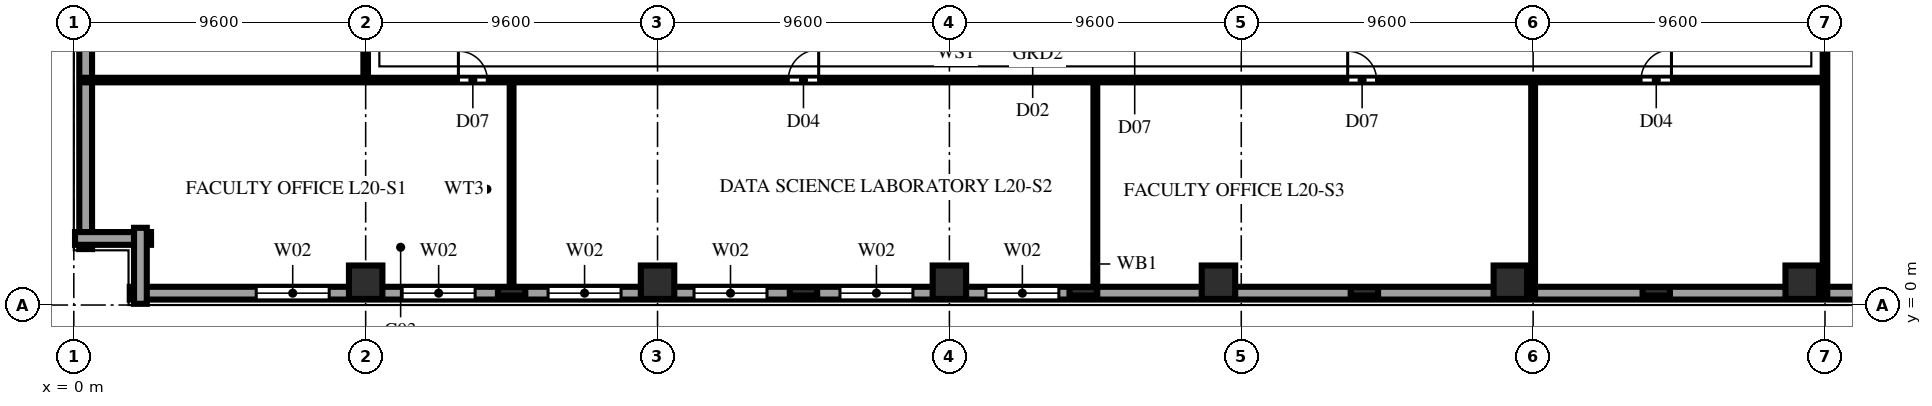
"""IFC4 building model, lengths in metres.
Left out: names, types, materials, properties, quantities, classifications, styles, units other than length and angle.
Written with IfcOpenShell. Run it as: python <this file> out.ifc"""

import sys

from ifc_helpers import new_model, si_unit, direction, frame, frame_2d, origin, origin_2d, place, context, subcontext, project, spatial, rectangle, extrude, element, fill, save


model = new_model("IFC4")
c1 = context("Model", 3, precision=1e-05, world=origin(), true_north=direction((0.0, 1.0)))
c2 = subcontext(c1, "Body", "Model", "MODEL_VIEW")
j1 = project(units=[si_unit("LENGTHUNIT", "METRE"), si_unit("PLANEANGLEUNIT", "RADIAN")], contexts=[c1])
p1 = place(None, origin())
s1 = spatial("IfcSite", under=j1, at=p1, CompositionType="ELEMENT")
p2 = place(p1, origin())
s2 = spatial("IfcBuilding", under=s1, at=p2, CompositionType="ELEMENT")
p3 = place(p2, frame((0.0, 0.0, 81.2)))
s3 = spatial("IfcBuildingStorey", under=s2, at=p3, CompositionType="ELEMENT", Elevation=81.2)
for number, where, z_axis, x_axis in (
    (1, (9.6, 0.75, 0.0), (0.0, 0.0, 1.0), (1.0, 0.0, 0.0)),
    (2, (19.2, 0.75, 0.0), (0.0, 0.0, 1.0), (1.0, 0.0, 0.0)),
    (3, (28.8, 0.75, 0.0), (0.0, 0.0, 1.0), (1.0, 0.0, 0.0)),
    (4, (37.65, 0.75, 0.0), (0.0, 0.0, 1.0), (1.0, 0.0, 0.0)),
    (5, (47.25, 0.75, 0.0), (0.0, 0.0, 1.0), (1.0, 0.0, 0.0)),
    (6, (56.85, 0.75, 0.0), (0.0, 0.0, 1.0), (1.0, 0.0, 0.0)),
):
    element("IfcColumn", number, at=place(p3, frame(where, z_axis=z_axis, x_axis=x_axis)), inside=s3, PredefinedType="COLUMN", context=c2, shape_type="SweptSolid", body=[
        extrude(rectangle(XDim=1.1, YDim=1.1, at=origin_2d()), origin(), (0.0, 0.0, 1.0), 3.8),
    ])
for number, where, z_axis, x_axis in (
    (7, (14.4, 0.45, 0.0), (0.0, 0.0, 1.0), (1.0, 0.0, 0.0)),
    (8, (24.0, 0.45, 0.0), (0.0, 0.0, 1.0), (1.0, 0.0, 0.0)),
    (9, (33.2, 0.45, 0.0), (0.0, 0.0, 1.0), (1.0, 0.0, 0.0)),
    (10, (42.45, 0.45, 0.0), (0.0, 0.0, 1.0), (1.0, 0.0, 0.0)),
    (11, (52.05, 0.45, 0.0), (0.0, 0.0, 1.0), (1.0, 0.0, 0.0)),
):
    element("IfcColumn", number, at=place(p3, frame(where, z_axis=z_axis, x_axis=x_axis)), inside=s3, PredefinedType="PILASTER", context=c2, shape_type="SweptSolid", body=[
        extrude(rectangle(XDim=0.9, YDim=0.28, at=origin_2d()), origin(), (0.0, 0.0, 1.0), 3.8),
    ])
p4 = place(p3, frame((1.84, 0.39, 0.0), z_axis=(0.0, 0.0, 1.0), x_axis=(1.0, 0.0, 0.0)))
e12 = element("IfcWall", 12, at=p4, inside=s3, PredefinedType="SOLIDWALL", context=c2, shape_type="SweptSolid", body=[
    extrude(rectangle(XDim=63.52, YDim=0.42, at=frame_2d((31.76, 0.0))), origin(), (0.0, 0.0, 1.0), 3.54),
])
p5 = place(p4, frame((4.16, 0.0, 0.85)))
e13 = element("IfcOpeningElement", 13, at=p5, cuts=e12, PredefinedType="OPENING", context=c2, shape_type="SweptSolid", body=[
    extrude(rectangle(XDim=2.4, YDim=1.85, at=frame_2d((1.2, 0.925))), frame((0.0, 0.222, 0.0), z_axis=(0.0, -1.0, 0.0), x_axis=(1.0, 0.0, 0.0)), (0.0, 0.0, 1.0), 0.444),
])
p6 = place(p4, frame((8.96, 0.0, 0.85)))
e14 = element("IfcOpeningElement", 14, at=p6, cuts=e12, PredefinedType="OPENING", context=c2, shape_type="SweptSolid", body=[
    extrude(rectangle(XDim=2.4, YDim=1.85, at=frame_2d((1.2, 0.925))), frame((0.0, 0.222, 0.0), z_axis=(0.0, -1.0, 0.0), x_axis=(1.0, 0.0, 0.0)), (0.0, 0.0, 1.0), 0.444),
])
p7 = place(p4, frame((13.76, 0.0, 0.85)))
e15 = element("IfcOpeningElement", 15, at=p7, cuts=e12, PredefinedType="OPENING", context=c2, shape_type="SweptSolid", body=[
    extrude(rectangle(XDim=2.4, YDim=1.85, at=frame_2d((1.2, 0.925))), frame((0.0, 0.222, 0.0), z_axis=(0.0, -1.0, 0.0), x_axis=(1.0, 0.0, 0.0)), (0.0, 0.0, 1.0), 0.444),
])
p8 = place(p4, frame((18.56, 0.0, 0.85)))
e16 = element("IfcOpeningElement", 16, at=p8, cuts=e12, PredefinedType="OPENING", context=c2, shape_type="SweptSolid", body=[
    extrude(rectangle(XDim=2.4, YDim=1.85, at=frame_2d((1.2, 0.925))), frame((0.0, 0.222, 0.0), z_axis=(0.0, -1.0, 0.0), x_axis=(1.0, 0.0, 0.0)), (0.0, 0.0, 1.0), 0.444),
])
p9 = place(p4, frame((23.36, 0.0, 0.85)))
e17 = element("IfcOpeningElement", 17, at=p9, cuts=e12, PredefinedType="OPENING", context=c2, shape_type="SweptSolid", body=[
    extrude(rectangle(XDim=2.4, YDim=1.85, at=frame_2d((1.2, 0.925))), frame((0.0, 0.222, 0.0), z_axis=(0.0, -1.0, 0.0), x_axis=(1.0, 0.0, 0.0)), (0.0, 0.0, 1.0), 0.444),
])
p10 = place(p4, frame((28.16, 0.0, 0.85)))
e18 = element("IfcOpeningElement", 18, at=p10, cuts=e12, PredefinedType="OPENING", context=c2, shape_type="SweptSolid", body=[
    extrude(rectangle(XDim=2.4, YDim=1.85, at=frame_2d((1.2, 0.925))), frame((0.0, 0.222, 0.0), z_axis=(0.0, -1.0, 0.0), x_axis=(1.0, 0.0, 0.0)), (0.0, 0.0, 1.0), 0.444),
])
p11 = place(p3, frame((0.39, 65.36, 0.0), z_axis=(0.0, 0.0, 1.0), x_axis=(0.0, -1.0, 0.0)))
e19 = element("IfcWall", 19, at=p11, inside=s3, PredefinedType="SOLIDWALL", context=c2, shape_type="SweptSolid", body=[
    extrude(rectangle(XDim=63.52, YDim=0.42, at=frame_2d((31.76, 0.0))), origin(), (0.0, 0.0, 1.0), 3.54),
])
p12 = place(p11, frame((4.885, 0.0, 0.9)))
e20 = element("IfcOpeningElement", 20, at=p12, cuts=e19, PredefinedType="OPENING", context=c2, shape_type="SweptSolid", body=[
    extrude(rectangle(XDim=0.95, YDim=1.85, at=frame_2d((0.475, 0.925))), frame((0.0, 0.222, 0.0), z_axis=(0.0, -1.0, 0.0), x_axis=(1.0, 0.0, 0.0)), (0.0, 0.0, 1.0), 0.444),
])
p13 = place(p11, frame((9.41, 0.0, 0.9)))
e21 = element("IfcOpeningElement", 21, at=p13, cuts=e19, PredefinedType="OPENING", context=c2, shape_type="SweptSolid", body=[
    extrude(rectangle(XDim=1.5, YDim=1.85, at=frame_2d((0.75, 0.925))), frame((0.0, 0.222, 0.0), z_axis=(0.0, -1.0, 0.0), x_axis=(1.0, 0.0, 0.0)), (0.0, 0.0, 1.0), 0.444),
])
p14 = place(p11, frame((14.485, 0.0, 0.9)))
e22 = element("IfcOpeningElement", 22, at=p14, cuts=e19, PredefinedType="OPENING", context=c2, shape_type="SweptSolid", body=[
    extrude(rectangle(XDim=0.95, YDim=1.85, at=frame_2d((0.475, 0.925))), frame((0.0, 0.222, 0.0), z_axis=(0.0, -1.0, 0.0), x_axis=(1.0, 0.0, 0.0)), (0.0, 0.0, 1.0), 0.444),
])
p15 = place(p11, frame((19.01, 0.0, 0.9)))
e23 = element("IfcOpeningElement", 23, at=p15, cuts=e19, PredefinedType="OPENING", context=c2, shape_type="SweptSolid", body=[
    extrude(rectangle(XDim=1.5, YDim=1.85, at=frame_2d((0.75, 0.925))), frame((0.0, 0.222, 0.0), z_axis=(0.0, -1.0, 0.0), x_axis=(1.0, 0.0, 0.0)), (0.0, 0.0, 1.0), 0.444),
])
p16 = place(p11, frame((24.085, 0.0, 0.9)))
e24 = element("IfcOpeningElement", 24, at=p16, cuts=e19, PredefinedType="OPENING", context=c2, shape_type="SweptSolid", body=[
    extrude(rectangle(XDim=0.95, YDim=1.85, at=frame_2d((0.475, 0.925))), frame((0.0, 0.222, 0.0), z_axis=(0.0, -1.0, 0.0), x_axis=(1.0, 0.0, 0.0)), (0.0, 0.0, 1.0), 0.444),
])
p17 = place(p11, frame((28.61, 0.0, 0.9)))
e25 = element("IfcOpeningElement", 25, at=p17, cuts=e19, PredefinedType="OPENING", context=c2, shape_type="SweptSolid", body=[
    extrude(rectangle(XDim=1.5, YDim=1.85, at=frame_2d((0.75, 0.925))), frame((0.0, 0.222, 0.0), z_axis=(0.0, -1.0, 0.0), x_axis=(1.0, 0.0, 0.0)), (0.0, 0.0, 1.0), 0.444),
])
p18 = place(p11, frame((33.685, 0.0, 0.9)))
e26 = element("IfcOpeningElement", 26, at=p18, cuts=e19, PredefinedType="OPENING", context=c2, shape_type="SweptSolid", body=[
    extrude(rectangle(XDim=0.95, YDim=1.85, at=frame_2d((0.475, 0.925))), frame((0.0, 0.222, 0.0), z_axis=(0.0, -1.0, 0.0), x_axis=(1.0, 0.0, 0.0)), (0.0, 0.0, 1.0), 0.444),
])
p19 = place(p11, frame((38.21, 0.0, 0.9)))
e27 = element("IfcOpeningElement", 27, at=p19, cuts=e19, PredefinedType="OPENING", context=c2, shape_type="SweptSolid", body=[
    extrude(rectangle(XDim=1.5, YDim=1.85, at=frame_2d((0.75, 0.925))), frame((0.0, 0.222, 0.0), z_axis=(0.0, -1.0, 0.0), x_axis=(1.0, 0.0, 0.0)), (0.0, 0.0, 1.0), 0.444),
])
p20 = place(p11, frame((43.285, 0.0, 0.9)))
e28 = element("IfcOpeningElement", 28, at=p20, cuts=e19, PredefinedType="OPENING", context=c2, shape_type="SweptSolid", body=[
    extrude(rectangle(XDim=0.95, YDim=1.85, at=frame_2d((0.475, 0.925))), frame((0.0, 0.222, 0.0), z_axis=(0.0, -1.0, 0.0), x_axis=(1.0, 0.0, 0.0)), (0.0, 0.0, 1.0), 0.444),
])
p21 = place(p11, frame((47.81, 0.0, 0.9)))
e29 = element("IfcOpeningElement", 29, at=p21, cuts=e19, PredefinedType="OPENING", context=c2, shape_type="SweptSolid", body=[
    extrude(rectangle(XDim=1.5, YDim=1.85, at=frame_2d((0.75, 0.925))), frame((0.0, 0.222, 0.0), z_axis=(0.0, -1.0, 0.0), x_axis=(1.0, 0.0, 0.0)), (0.0, 0.0, 1.0), 0.444),
])
p22 = place(p11, frame((52.885, 0.0, 0.9)))
e30 = element("IfcOpeningElement", 30, at=p22, cuts=e19, PredefinedType="OPENING", context=c2, shape_type="SweptSolid", body=[
    extrude(rectangle(XDim=0.95, YDim=1.85, at=frame_2d((0.475, 0.925))), frame((0.0, 0.222, 0.0), z_axis=(0.0, -1.0, 0.0), x_axis=(1.0, 0.0, 0.0)), (0.0, 0.0, 1.0), 0.444),
])
for number, where, z_axis, x_axis in (
    (31, (0.04, 2.19, 0.0), (0.0, 0.0, 1.0), (1.0, 0.0, 0.0)),
    (32, (2.19, 2.54, 0.0), (0.0, 0.0, 1.0), (0.0, -1.0, 0.0)),
):
    element("IfcWall", number, at=place(p3, frame(where, z_axis=z_axis, x_axis=x_axis)), inside=s3, PredefinedType="SOLIDWALL", context=c2, shape_type="SweptSolid", body=[
        extrude(rectangle(XDim=2.5, YDim=0.42, at=frame_2d((1.25, 0.0))), origin(), (0.0, 0.0, 1.0), 3.54),
    ])
p23 = place(p3, frame((9.6, 7.4, 0.0), z_axis=(0.0, 0.0, 1.0), x_axis=(0.0, 1.0, 0.0)))
e33 = element("IfcWall", 33, at=p23, inside=s3, PredefinedType="PARTITIONING", context=c2, shape_type="SweptSolid", body=[
    extrude(rectangle(XDim=2.2, YDim=0.15, at=frame_2d((1.1, 0.0))), origin(), (0.0, 0.0, 1.0), 3.071),
])
for number, where, z_axis, x_axis in (
    (34, (14.4, 0.22, 0.0), (0.0, 0.0, 1.0), (0.0, 1.0, 0.0)),
    (35, (33.6, 0.22, 0.0), (0.0, 0.0, 1.0), (0.0, 1.0, 0.0)),
    (36, (48.0, 0.22, 0.0), (0.0, 0.0, 1.0), (0.0, 1.0, 0.0)),
):
    element("IfcWall", number, at=place(p3, frame(where, z_axis=z_axis, x_axis=x_axis)), inside=s3, PredefinedType="PARTITIONING", context=c2, shape_type="SweptSolid", body=[
        extrude(rectangle(XDim=7.18, YDim=0.125, at=frame_2d((3.59, 0.0))), origin(), (0.0, 0.0, 1.0), 3.54),
    ])
p24 = place(p3, frame((0.22, 7.4, 0.0), z_axis=(0.0, 0.0, 1.0), x_axis=(1.0, 0.0, 0.0)))
e37 = element("IfcWall", 37, at=p24, inside=s3, PredefinedType="PARTITIONING", context=c2, shape_type="SweptSolid", body=[
    extrude(rectangle(XDim=57.38, YDim=0.15, at=frame_2d((28.69, 0.0))), origin(), (0.0, 0.0, 1.0), 3.54),
])
p25 = place(p24, frame((12.43, 0.0, 0.0)))
e38 = element("IfcOpeningElement", 38, at=p25, cuts=e37, PredefinedType="OPENING", context=c2, shape_type="SweptSolid", body=[
    extrude(rectangle(XDim=0.95, YDim=2.15, at=frame_2d((0.475, 1.075))), frame((0.0, 0.087, 0.0), z_axis=(0.0, -1.0, 0.0), x_axis=(1.0, 0.0, 0.0)), (0.0, 0.0, 1.0), 0.174),
])
p26 = place(p24, frame((23.28, 0.0, 0.0)))
e39 = element("IfcOpeningElement", 39, at=p26, cuts=e37, PredefinedType="OPENING", context=c2, shape_type="SweptSolid", body=[
    extrude(rectangle(XDim=1.0, YDim=2.2, at=frame_2d((0.5, 1.1))), frame((0.0, 0.087, 0.0), z_axis=(0.0, -1.0, 0.0), x_axis=(1.0, 0.0, 0.0)), (0.0, 0.0, 1.0), 0.174),
])
p27 = place(p24, frame((41.68, 0.0, 0.0)))
e40 = element("IfcOpeningElement", 40, at=p27, cuts=e37, PredefinedType="OPENING", context=c2, shape_type="SweptSolid", body=[
    extrude(rectangle(XDim=0.95, YDim=2.15, at=frame_2d((0.475, 1.075))), frame((0.0, 0.087, 0.0), z_axis=(0.0, -1.0, 0.0), x_axis=(1.0, 0.0, 0.0)), (0.0, 0.0, 1.0), 0.174),
])
p28 = place(p24, frame((51.33, 0.0, 0.0)))
e41 = element("IfcOpeningElement", 41, at=p28, cuts=e37, PredefinedType="OPENING", context=c2, shape_type="SweptSolid", body=[
    extrude(rectangle(XDim=1.0, YDim=2.2, at=frame_2d((0.5, 1.1))), frame((0.0, 0.087, 0.0), z_axis=(0.0, -1.0, 0.0), x_axis=(1.0, 0.0, 0.0)), (0.0, 0.0, 1.0), 0.174),
])
p29 = place(p3, frame((57.6, 0.22, 0.0), z_axis=(0.0, 0.0, 1.0), x_axis=(0.0, 1.0, 0.0)))
e42 = element("IfcWall", 42, at=p29, inside=s3, PredefinedType="PARTITIONING", context=c2, shape_type="SweptSolid", body=[
    extrude(rectangle(XDim=37.96, YDim=0.15, at=frame_2d((18.98, 0.0))), origin(), (0.0, 0.0, 1.0), 3.54),
])
p30 = place(p29, frame((13.73, 0.0, 0.0)))
e43 = element("IfcOpeningElement", 43, at=p30, cuts=e42, PredefinedType="OPENING", context=c2, shape_type="SweptSolid", body=[
    extrude(rectangle(XDim=0.95, YDim=2.15, at=frame_2d((0.475, 1.075))), frame((0.0, 0.087, 0.0), z_axis=(0.0, -1.0, 0.0), x_axis=(1.0, 0.0, 0.0)), (0.0, 0.0, 1.0), 0.174),
])
p31 = place(p5, origin())
e44 = element("IfcWindow", 44, at=p31, inside=s3, PartitioningType="TRIPLE_PANEL_VERTICAL", PredefinedType="WINDOW", context=c2, shape_type="SweptSolid", body=[
    extrude(rectangle(XDim=2.4, YDim=1.85, at=frame_2d((1.2, 0.925))), frame((0.0, 0.11, 0.0), z_axis=(0.0, -1.0, 0.0), x_axis=(1.0, 0.0, 0.0)), (0.0, 0.0, 1.0), 0.06),
])
fill(e13, e44)
p32 = place(p6, origin())
e45 = element("IfcWindow", 45, at=p32, inside=s3, PartitioningType="TRIPLE_PANEL_VERTICAL", PredefinedType="WINDOW", context=c2, shape_type="SweptSolid", body=[
    extrude(rectangle(XDim=2.4, YDim=1.85, at=frame_2d((1.2, 0.925))), frame((0.0, 0.11, 0.0), z_axis=(0.0, -1.0, 0.0), x_axis=(1.0, 0.0, 0.0)), (0.0, 0.0, 1.0), 0.06),
])
fill(e14, e45)
p33 = place(p7, origin())
e46 = element("IfcWindow", 46, at=p33, inside=s3, PartitioningType="TRIPLE_PANEL_VERTICAL", PredefinedType="WINDOW", context=c2, shape_type="SweptSolid", body=[
    extrude(rectangle(XDim=2.4, YDim=1.85, at=frame_2d((1.2, 0.925))), frame((0.0, 0.11, 0.0), z_axis=(0.0, -1.0, 0.0), x_axis=(1.0, 0.0, 0.0)), (0.0, 0.0, 1.0), 0.06),
])
fill(e15, e46)
p34 = place(p8, origin())
e47 = element("IfcWindow", 47, at=p34, inside=s3, PartitioningType="TRIPLE_PANEL_VERTICAL", PredefinedType="WINDOW", context=c2, shape_type="SweptSolid", body=[
    extrude(rectangle(XDim=2.4, YDim=1.85, at=frame_2d((1.2, 0.925))), frame((0.0, 0.11, 0.0), z_axis=(0.0, -1.0, 0.0), x_axis=(1.0, 0.0, 0.0)), (0.0, 0.0, 1.0), 0.06),
])
fill(e16, e47)
p35 = place(p9, origin())
e48 = element("IfcWindow", 48, at=p35, inside=s3, PartitioningType="TRIPLE_PANEL_VERTICAL", PredefinedType="WINDOW", context=c2, shape_type="SweptSolid", body=[
    extrude(rectangle(XDim=2.4, YDim=1.85, at=frame_2d((1.2, 0.925))), frame((0.0, 0.11, 0.0), z_axis=(0.0, -1.0, 0.0), x_axis=(1.0, 0.0, 0.0)), (0.0, 0.0, 1.0), 0.06),
])
fill(e17, e48)
p36 = place(p10, origin())
e49 = element("IfcWindow", 49, at=p36, inside=s3, PartitioningType="TRIPLE_PANEL_VERTICAL", PredefinedType="WINDOW", context=c2, shape_type="SweptSolid", body=[
    extrude(rectangle(XDim=2.4, YDim=1.85, at=frame_2d((1.2, 0.925))), frame((0.0, 0.11, 0.0), z_axis=(0.0, -1.0, 0.0), x_axis=(1.0, 0.0, 0.0)), (0.0, 0.0, 1.0), 0.06),
])
fill(e18, e49)
p37 = place(p25, origin())
e50 = element("IfcDoor", 50, at=p37, inside=s3, OperationType="SINGLE_SWING_LEFT", PredefinedType="DOOR", context=c2, shape_type="SweptSolid", body=[
    extrude(rectangle(XDim=0.95, YDim=2.15, at=frame_2d((0.475, 1.075))), frame((0.0, 0.025, 0.0), z_axis=(0.0, -1.0, 0.0), x_axis=(1.0, 0.0, 0.0)), (0.0, 0.0, 1.0), 0.05),
])
fill(e38, e50)
p38 = place(p26, origin())
e51 = element("IfcDoor", 51, at=p38, inside=s3, OperationType="SINGLE_SWING_RIGHT", PredefinedType="DOOR", context=c2, shape_type="SweptSolid", body=[
    extrude(rectangle(XDim=1.0, YDim=2.2, at=frame_2d((0.5, 1.1))), frame((0.0, 0.025, 0.0), z_axis=(0.0, -1.0, 0.0), x_axis=(1.0, 0.0, 0.0)), (0.0, 0.0, 1.0), 0.05),
])
fill(e39, e51)
p39 = place(p27, origin())
e52 = element("IfcDoor", 52, at=p39, inside=s3, OperationType="SINGLE_SWING_LEFT", PredefinedType="DOOR", context=c2, shape_type="SweptSolid", body=[
    extrude(rectangle(XDim=0.95, YDim=2.15, at=frame_2d((0.475, 1.075))), frame((0.0, 0.025, 0.0), z_axis=(0.0, -1.0, 0.0), x_axis=(1.0, 0.0, 0.0)), (0.0, 0.0, 1.0), 0.05),
])
fill(e40, e52)
p40 = place(p28, origin())
e53 = element("IfcDoor", 53, at=p40, inside=s3, OperationType="SINGLE_SWING_RIGHT", PredefinedType="DOOR", context=c2, shape_type="SweptSolid", body=[
    extrude(rectangle(XDim=1.0, YDim=2.2, at=frame_2d((0.5, 1.1))), frame((0.0, 0.025, 0.0), z_axis=(0.0, -1.0, 0.0), x_axis=(1.0, 0.0, 0.0)), (0.0, 0.0, 1.0), 0.05),
])
fill(e41, e53)
save(model, sys.argv[1])
